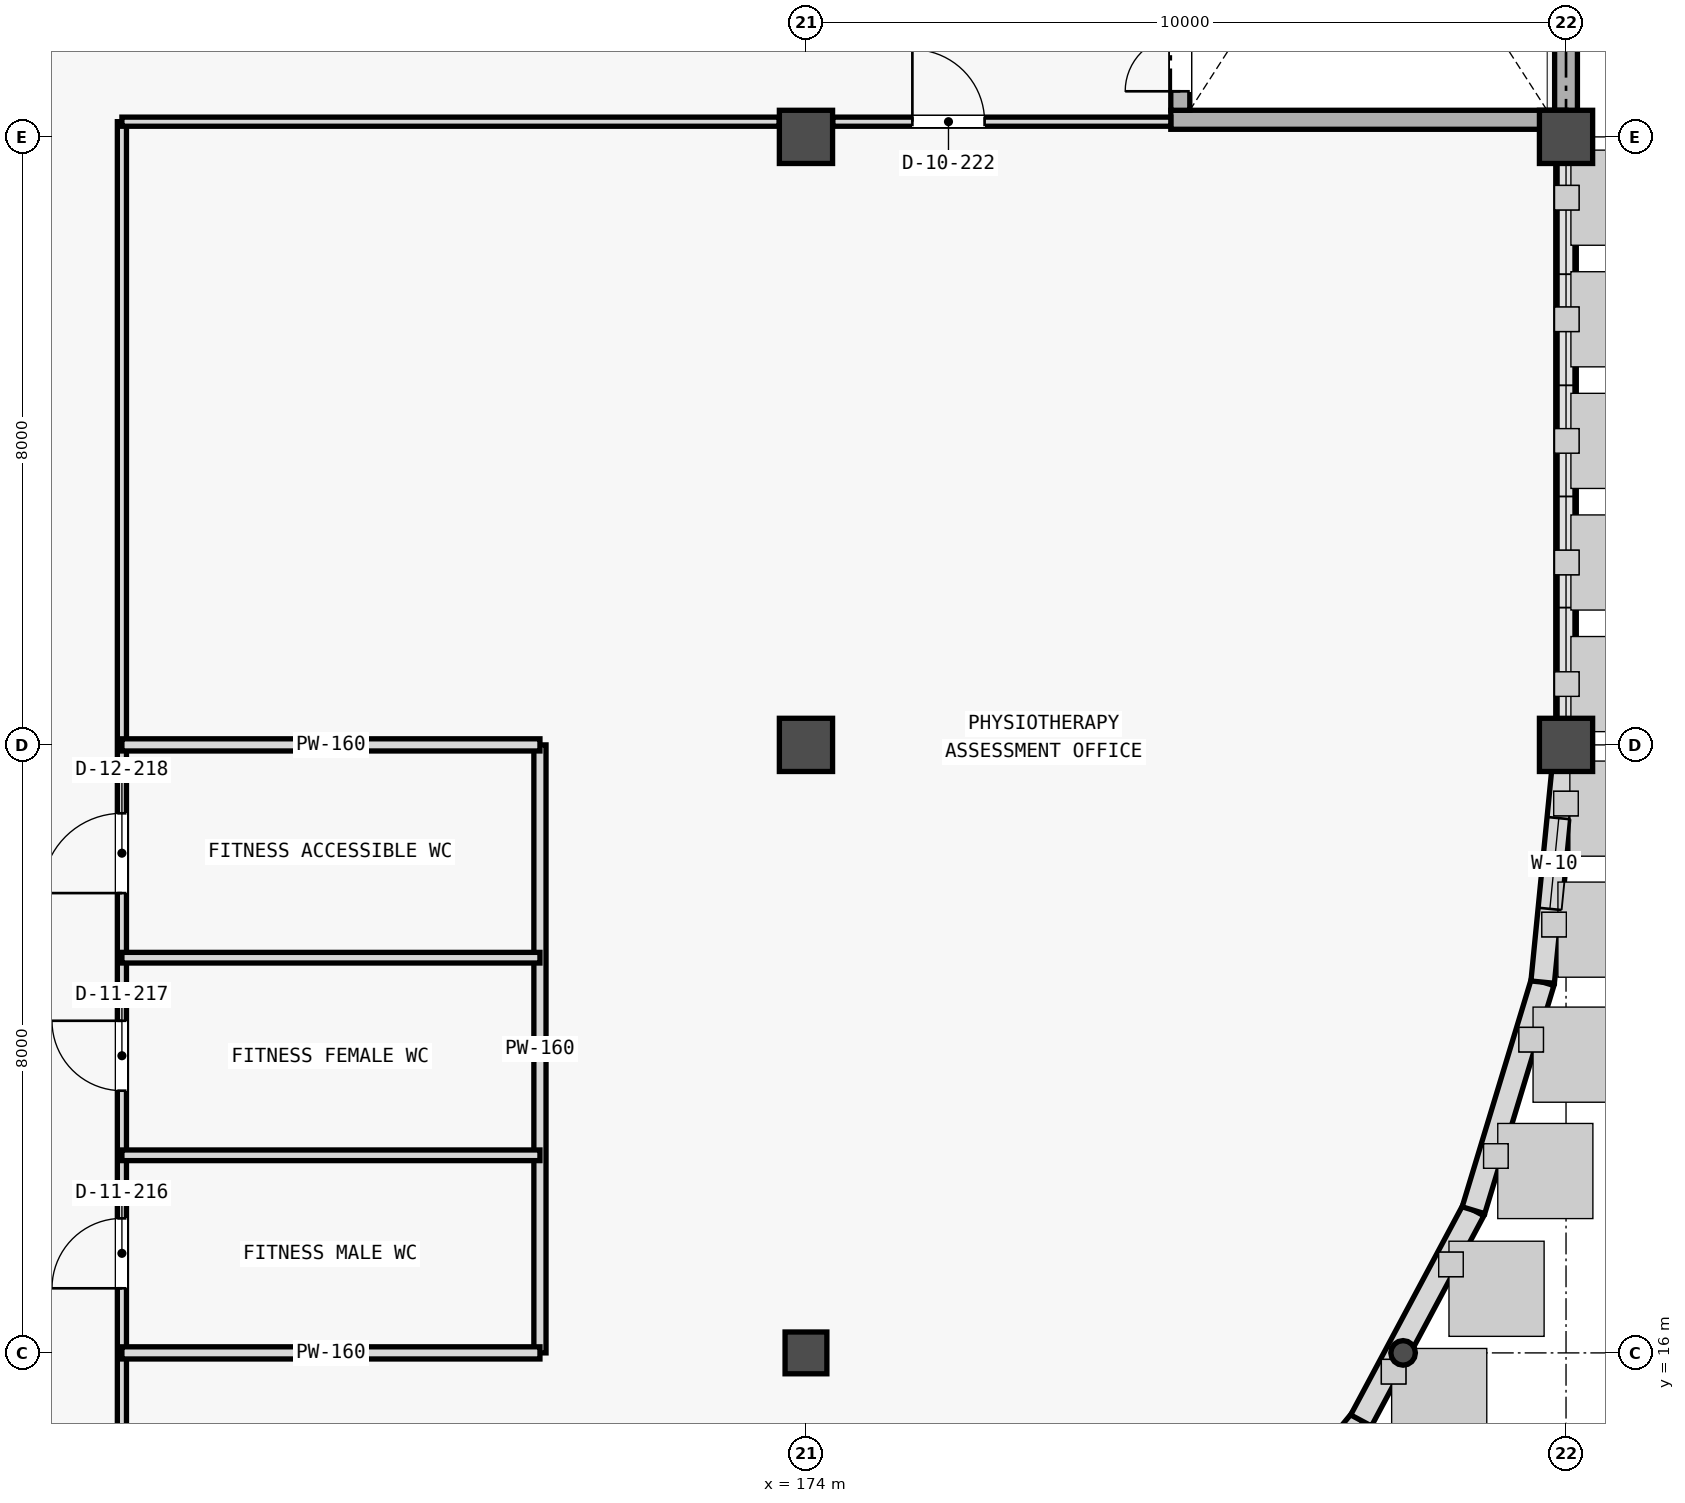
"""IFC4 building model, lengths in metres.
Left out: names, types, materials, properties, quantities, classifications, styles, units other than length and angle.
Written with IfcOpenShell. Run it as: python <this file> out.ifc"""

import sys

from ifc_helpers import new_model, si_unit, direction, frame, frame_2d, origin, origin_2d, place, context, subcontext, project, spatial, rectangle, hollow_circle, extrude, element, fill, save


model = new_model("IFC4")
c1 = context("Model", 3, precision=1e-05, world=origin(), true_north=direction((0.0, 1.0)))
c2 = subcontext(c1, "Body", "Model", "MODEL_VIEW")
j1 = project(units=[si_unit("LENGTHUNIT", "METRE"), si_unit("PLANEANGLEUNIT", "RADIAN")], contexts=[c1])
p1 = place(None, origin())
s1 = spatial("IfcSite", under=j1, at=p1, CompositionType="ELEMENT")
p2 = place(p1, origin())
s2 = spatial("IfcBuilding", under=s1, at=p2, CompositionType="ELEMENT")
p3 = place(p2, frame((0.0, 0.0, 5.4)))
s3 = spatial("IfcBuildingStorey", under=s2, at=p3, CompositionType="ELEMENT", Elevation=5.4)
p4 = place(p3, frame((174.0, 16.0, 0.0), z_axis=(0.0, 0.0, 1.0), x_axis=(1.0, 0.0, 0.0)))
e1 = element("IfcColumn", 1, at=p4, inside=s3, PredefinedType="COLUMN", context=c2, shape_type="SweptSolid", body=[
    extrude(rectangle(XDim=0.55, YDim=0.55, at=origin_2d()), origin(), (0.0, 0.0, 1.0), 4.55),
])
for number, where, z_axis, x_axis in (
    (2, (174.0, 24.0, 0.0), (0.0, 0.0, 1.0), (1.0, 0.0, 0.0)),
    (3, (184.0, 24.0, 0.0), (0.0, 0.0, 1.0), (1.0, 0.0, 0.0)),
    (4, (174.0, 32.0, 0.0), (0.0, 0.0, 1.0), (1.0, 0.0, 0.0)),
    (5, (184.0, 32.0, 0.0), (0.0, 0.0, 1.0), (1.0, 0.0, 0.0)),
):
    element("IfcColumn", number, at=place(p3, frame(where, z_axis=z_axis, x_axis=x_axis)), inside=s3, PredefinedType="COLUMN", context=c2, shape_type="SweptSolid", body=[
        extrude(rectangle(XDim=0.7, YDim=0.7, at=origin_2d()), origin(), (0.0, 0.0, 1.0), 4.55),
    ])
p5 = place(p3, frame((181.856, 16.0, 0.0), z_axis=(0.0, 0.0, 1.0), x_axis=(1.0, 0.0, 0.0)))
e6 = element("IfcColumn", 6, at=p5, inside=s3, PredefinedType="PILASTER", context=c2, shape_type="SweptSolid", body=[
    extrude(hollow_circle(Radius=0.162, WallThickness=0.012, at=origin_2d()), origin(), (0.0, 0.0, 1.0), 4.55),
])
p6 = place(p3, frame((184.0, 24.346, 0.0), z_axis=(0.0, 0.0, 1.0), x_axis=(0.0, 1.0, 0.0)))
e7 = element("IfcWall", 7, at=p6, inside=s3, PredefinedType="STANDARD", context=c2, shape_type="SweptSolid", body=[
    extrude(rectangle(XDim=7.308, YDim=0.27, at=frame_2d((3.654, 0.0))), origin(), (0.0, 0.0, 1.0), 0.8),
])
p7 = place(p3, frame((184.0, 32.346, 0.0), z_axis=(0.0, 0.0, 1.0), x_axis=(0.0, 1.0, 0.0)))
e8 = element("IfcWall", 8, at=p7, inside=s3, PredefinedType="SHEAR", context=c2, shape_type="SweptSolid", body=[
    extrude(rectangle(XDim=7.308, YDim=0.3, at=frame_2d((3.654, 0.0))), origin(), (0.0, 0.0, 1.0), 4.8),
])
p8 = place(p3, frame((179.314, 12.686, 0.0), z_axis=(0.0, 0.0, 1.0), x_axis=(0.634385792339, 0.773016601683, 0.0)))
e9 = element("IfcWall", 9, at=p8, inside=s3, PredefinedType="STANDARD", context=c2, shape_type="SweptSolid", body=[
    extrude(rectangle(XDim=3.136, YDim=0.31, at=frame_2d((1.568, 0.0))), origin(), (0.0, 0.0, 1.0), 4.3),
])
p9 = place(p8, frame((1.018, 0.0, 1.0)))
e10 = element("IfcOpeningElement", 10, at=p9, cuts=e9, PredefinedType="OPENING", context=c2, shape_type="SweptSolid", body=[
    extrude(rectangle(XDim=1.1, YDim=1.85, at=frame_2d((0.55, 0.925))), frame((0.0, 0.165, 0.0), z_axis=(0.0, -1.0, 0.0), x_axis=(1.0, 0.0, 0.0)), (0.0, 0.0, 1.0), 0.33),
])
p10 = place(p3, frame((181.303, 15.111, 0.0), z_axis=(0.0, 0.0, 1.0), x_axis=(0.471396060548, 0.881921625826, 0.0)))
e11 = element("IfcWall", 11, at=p10, inside=s3, PredefinedType="STANDARD", context=c2, shape_type="SweptSolid", body=[
    extrude(rectangle(XDim=3.136, YDim=0.31, at=frame_2d((1.568, 0.0))), origin(), (0.0, 0.0, 1.0), 4.23),
])
p11 = place(p3, frame((182.782, 17.877, 0.0), z_axis=(0.0, 0.0, 1.0), x_axis=(0.29030980253, 0.956932713703, 0.0)))
e12 = element("IfcWall", 12, at=p11, inside=s3, PredefinedType="STANDARD", context=c2, shape_type="SweptSolid", body=[
    extrude(rectangle(XDim=3.137, YDim=0.31, at=frame_2d((1.568, 0.0))), origin(), (0.0, 0.0, 1.0), 4.3),
])
p12 = place(p3, frame((183.693, 20.879, 0.0), z_axis=(0.0, 0.0, 1.0), x_axis=(0.098000751113, 0.995186340733, 0.0)))
e13 = element("IfcWall", 13, at=p12, inside=s3, PredefinedType="STANDARD", context=c2, shape_type="SweptSolid", body=[
    extrude(rectangle(XDim=3.136, YDim=0.31, at=frame_2d((1.568, 0.0))), origin(), (0.0, 0.0, 1.0), 3.68),
])
p13 = place(p12, frame((0.968, 0.0, 1.0)))
e14 = element("IfcOpeningElement", 14, at=p13, cuts=e13, PredefinedType="OPENING", context=c2, shape_type="SweptSolid", body=[
    extrude(rectangle(XDim=1.2, YDim=1.6, at=frame_2d((0.6, 0.8))), frame((0.0, 0.165, 0.0), z_axis=(0.0, -1.0, 0.0), x_axis=(1.0, 0.0, 0.0)), (0.0, 0.0, 1.0), 0.33),
])
p14 = place(p3, frame((178.8, 32.225, 0.0), z_axis=(0.0, 0.0, 1.0), x_axis=(1.0, 0.0, 0.0)))
e15 = element("IfcWall", 15, at=p14, inside=s3, PredefinedType="SHEAR", context=c2, shape_type="SweptSolid", body=[
    extrude(rectangle(XDim=5.2, YDim=0.25, at=frame_2d((2.6, 0.0))), origin(), (0.0, 0.0, 1.0), 4.8),
])
p15 = place(p3, frame((178.925, 32.35, 0.0), z_axis=(0.0, 0.0, 1.0), x_axis=(0.0, 1.0, 0.0)))
e16 = element("IfcWall", 16, at=p15, inside=s3, PredefinedType="SHEAR", context=c2, shape_type="SweptSolid", body=[
    extrude(rectangle(XDim=7.3, YDim=0.25, at=frame_2d((3.65, 0.0))), origin(), (0.0, 0.0, 1.0), 4.8),
])
p16 = place(p15, frame((0.25, 0.0, 0.0)))
e17 = element("IfcOpeningElement", 17, at=p16, cuts=e16, PredefinedType="OPENING", context=c2, shape_type="SweptSolid", body=[
    extrude(rectangle(XDim=1.45, YDim=2.2, at=frame_2d((0.725, 1.1))), frame((0.0, 0.135, 0.0), z_axis=(0.0, -1.0, 0.0), x_axis=(1.0, 0.0, 0.0)), (0.0, 0.0, 1.0), 0.27),
])
p17 = place(p3, frame((165.0, 8.15, 0.0), z_axis=(0.0, 0.0, 1.0), x_axis=(0.0, 1.0, 0.0)))
e18 = element("IfcWall", 18, at=p17, inside=s3, PredefinedType="PARTITIONING", context=c2, shape_type="SweptSolid", body=[
    extrude(rectangle(XDim=24.05, YDim=0.12, at=frame_2d((12.025, 0.0))), origin(), (0.0, 0.0, 1.0), 3.58),
])
p18 = place(p17, frame((8.7, 0.0, 0.0)))
e19 = element("IfcOpeningElement", 19, at=p18, cuts=e18, PredefinedType="OPENING", context=c2, shape_type="SweptSolid", body=[
    extrude(rectangle(XDim=0.92, YDim=2.1, at=frame_2d((0.46, 1.05))), frame((0.0, 0.07, 0.0), z_axis=(0.0, -1.0, 0.0), x_axis=(1.0, 0.0, 0.0)), (0.0, 0.0, 1.0), 0.14),
])
p19 = place(p17, frame((11.3, 0.0, 0.0)))
e20 = element("IfcOpeningElement", 20, at=p19, cuts=e18, PredefinedType="OPENING", context=c2, shape_type="SweptSolid", body=[
    extrude(rectangle(XDim=0.92, YDim=2.1, at=frame_2d((0.46, 1.05))), frame((0.0, 0.07, 0.0), z_axis=(0.0, -1.0, 0.0), x_axis=(1.0, 0.0, 0.0)), (0.0, 0.0, 1.0), 0.14),
])
p20 = place(p17, frame((13.9, 0.0, 0.0)))
e21 = element("IfcOpeningElement", 21, at=p20, cuts=e18, PredefinedType="OPENING", context=c2, shape_type="SweptSolid", body=[
    extrude(rectangle(XDim=1.05, YDim=2.15, at=frame_2d((0.525, 1.075))), frame((0.0, 0.07, 0.0), z_axis=(0.0, -1.0, 0.0), x_axis=(1.0, 0.0, 0.0)), (0.0, 0.0, 1.0), 0.14),
])
p21 = place(p3, frame((170.5, 16.0, 0.0), z_axis=(0.0, 0.0, 1.0), x_axis=(0.0, 1.0, 0.0)))
e22 = element("IfcWall", 22, at=p21, inside=s3, PredefinedType="PARTITIONING", context=c2, shape_type="SweptSolid", body=[
    extrude(rectangle(XDim=8.0, YDim=0.16, at=frame_2d((4.0, 0.0))), origin(), (0.0, 0.0, 1.0), 3.58),
])
p22 = place(p3, frame((165.0, 16.0, 0.0), z_axis=(0.0, 0.0, 1.0), x_axis=(1.0, 0.0, 0.0)))
e23 = element("IfcWall", 23, at=p22, inside=s3, PredefinedType="PARTITIONING", context=c2, shape_type="SweptSolid", body=[
    extrude(rectangle(XDim=5.5, YDim=0.16, at=frame_2d((2.75, 0.0))), origin(), (0.0, 0.0, 1.0), 3.73),
])
for number, where, z_axis, x_axis in (
    (24, (165.0, 18.6, 0.0), (0.0, 0.0, 1.0), (1.0, 0.0, 0.0)),
    (25, (165.0, 21.2, 0.0), (0.0, 0.0, 1.0), (1.0, 0.0, 0.0)),
):
    element("IfcWall", number, at=place(p3, frame(where, z_axis=z_axis, x_axis=x_axis)), inside=s3, PredefinedType="PLUMBINGWALL", context=c2, shape_type="SweptSolid", body=[
        extrude(rectangle(XDim=5.5, YDim=0.14, at=frame_2d((2.75, 0.0))), origin(), (0.0, 0.0, 1.0), 4.26),
    ])
p23 = place(p3, frame((165.0, 24.0, 0.0), z_axis=(0.0, 0.0, 1.0), x_axis=(1.0, 0.0, 0.0)))
e26 = element("IfcWall", 26, at=p23, inside=s3, PredefinedType="PARTITIONING", context=c2, shape_type="SweptSolid", body=[
    extrude(rectangle(XDim=5.5, YDim=0.16, at=frame_2d((2.75, 0.0))), origin(), (0.0, 0.0, 1.0), 3.58),
])
p24 = place(p3, frame((165.0, 32.2, 0.0), z_axis=(0.0, 0.0, 1.0), x_axis=(1.0, 0.0, 0.0)))
e27 = element("IfcWall", 27, at=p24, inside=s3, PredefinedType="PARTITIONING", context=c2, shape_type="SweptSolid", body=[
    extrude(rectangle(XDim=8.648, YDim=0.12, at=frame_2d((4.324, 0.0))), origin(), (0.0, 0.0, 1.0), 3.58),
])
p25 = place(p3, frame((174.352, 32.2, 0.0), z_axis=(0.0, 0.0, 1.0), x_axis=(1.0, 0.0, 0.0)))
e28 = element("IfcWall", 28, at=p25, inside=s3, PredefinedType="PARTITIONING", context=c2, shape_type="SweptSolid", body=[
    extrude(rectangle(XDim=4.448, YDim=0.12, at=frame_2d((2.224, 0.0))), origin(), (0.0, 0.0, 1.0), 3.68),
])
p26 = place(p25, frame((1.048, 0.0, 0.0)))
e29 = element("IfcOpeningElement", 29, at=p26, cuts=e28, PredefinedType="OPENING", context=c2, shape_type="SweptSolid", body=[
    extrude(rectangle(XDim=0.95, YDim=2.15, at=frame_2d((0.475, 1.075))), frame((0.0, 0.07, 0.0), z_axis=(0.0, -1.0, 0.0), x_axis=(1.0, 0.0, 0.0)), (0.0, 0.0, 1.0), 0.14),
])
p27 = place(p13, origin())
e30 = element("IfcWindow", 30, at=p27, inside=s3, PartitioningType="SINGLE_PANEL", PredefinedType="WINDOW", context=c2, shape_type="SweptSolid", body=[
    extrude(rectangle(XDim=1.2, YDim=1.6, at=frame_2d((0.6, 0.8))), frame((0.0, 0.03, 0.0), z_axis=(0.0, -1.0, 0.0), x_axis=(1.0, 0.0, 0.0)), (0.0, 0.0, 1.0), 0.06),
])
fill(e14, e30)
p28 = place(p16, origin())
e31 = element("IfcDoor", 31, at=p28, inside=s3, OperationType="DOUBLE_DOOR_SINGLE_SWING", PredefinedType="DOOR", context=c2, shape_type="SweptSolid", body=[
    extrude(rectangle(XDim=1.45, YDim=2.2, at=frame_2d((0.725, 1.1))), frame((0.0, 0.025, 0.0), z_axis=(0.0, -1.0, 0.0), x_axis=(1.0, 0.0, 0.0)), (0.0, 0.0, 1.0), 0.05),
])
fill(e17, e31)
p29 = place(p18, origin())
e32 = element("IfcDoor", 32, at=p29, inside=s3, OperationType="SINGLE_SWING_LEFT", PredefinedType="DOOR", context=c2, shape_type="SweptSolid", body=[
    extrude(rectangle(XDim=0.92, YDim=2.1, at=frame_2d((0.46, 1.05))), frame((0.0, 0.025, 0.0), z_axis=(0.0, -1.0, 0.0), x_axis=(1.0, 0.0, 0.0)), (0.0, 0.0, 1.0), 0.05),
])
fill(e19, e32)
p30 = place(p19, origin())
e33 = element("IfcDoor", 33, at=p30, inside=s3, OperationType="SINGLE_SWING_RIGHT", PredefinedType="DOOR", context=c2, shape_type="SweptSolid", body=[
    extrude(rectangle(XDim=0.92, YDim=2.1, at=frame_2d((0.46, 1.05))), frame((0.0, 0.025, 0.0), z_axis=(0.0, -1.0, 0.0), x_axis=(1.0, 0.0, 0.0)), (0.0, 0.0, 1.0), 0.05),
])
fill(e20, e33)
p31 = place(p20, origin())
e34 = element("IfcDoor", 34, at=p31, inside=s3, OperationType="SINGLE_SWING_LEFT", PredefinedType="DOOR", context=c2, shape_type="SweptSolid", body=[
    extrude(rectangle(XDim=1.05, YDim=2.15, at=frame_2d((0.525, 1.075))), frame((0.0, 0.025, 0.0), z_axis=(0.0, -1.0, 0.0), x_axis=(1.0, 0.0, 0.0)), (0.0, 0.0, 1.0), 0.05),
])
fill(e21, e34)
p32 = place(p26, origin())
e35 = element("IfcDoor", 35, at=p32, inside=s3, OperationType="SINGLE_SWING_LEFT", PredefinedType="DOOR", context=c2, shape_type="SweptSolid", body=[
    extrude(rectangle(XDim=0.95, YDim=2.15, at=frame_2d((0.475, 1.075))), frame((0.0, 0.025, 0.0), z_axis=(0.0, -1.0, 0.0), x_axis=(1.0, 0.0, 0.0)), (0.0, 0.0, 1.0), 0.05),
])
fill(e29, e35)
save(model, sys.argv[1])
